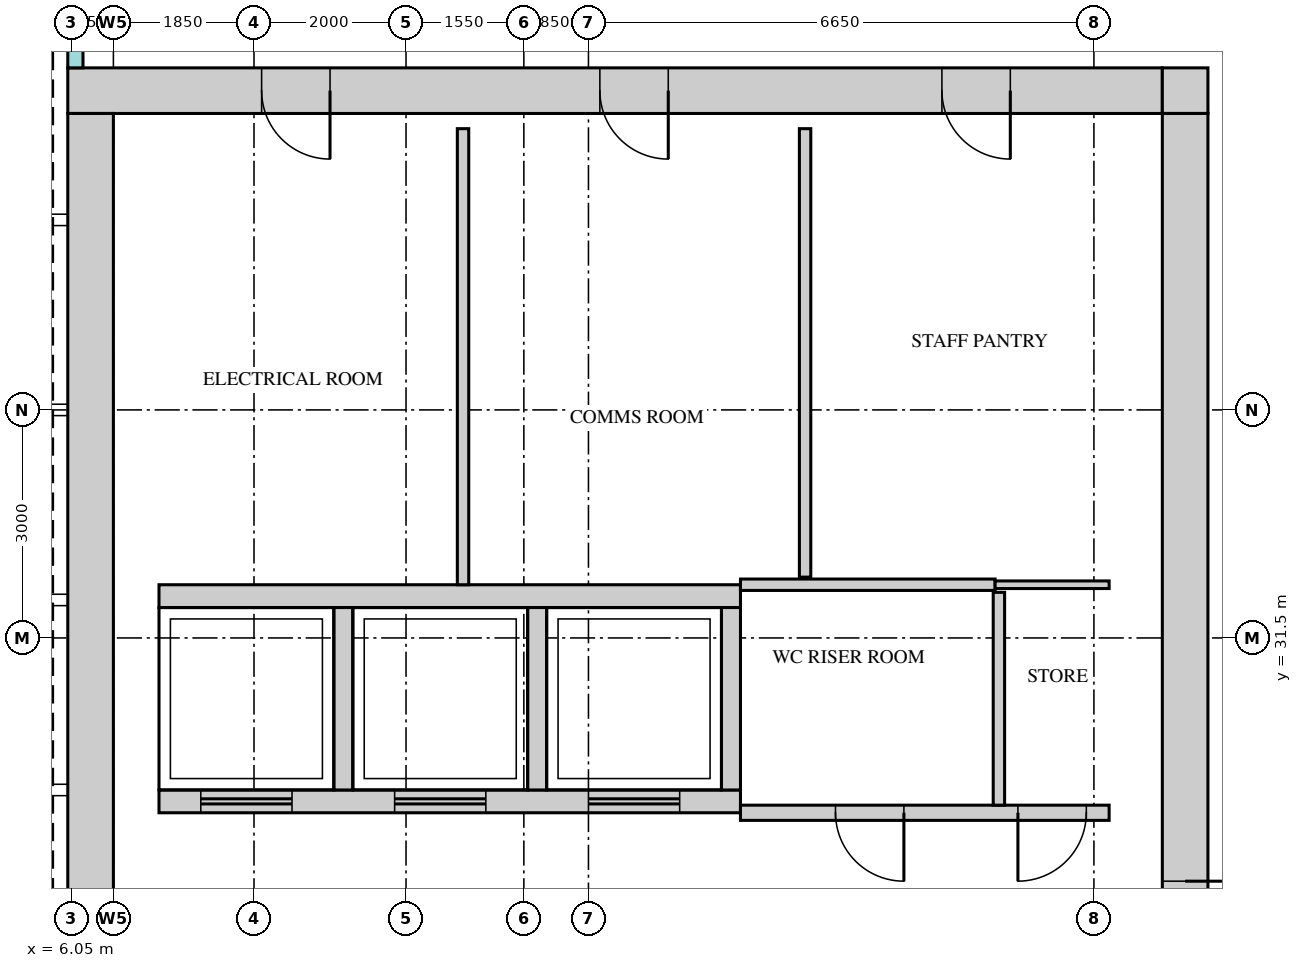
"""IFC4 building model, lengths in metres.
Left out: names, types, materials, properties, quantities, classifications, styles, units other than length and angle.
Written with IfcOpenShell. Run it as: python <this file> out.ifc"""

import sys

from ifc_helpers import new_model, si_unit, direction, frame, frame_2d, origin, place, context, subcontext, project, spatial, rectangle, extrude, source, transform, mapped, element, fill, save


model = new_model("IFC4")
c1 = context("Model", 3, precision=1e-05, world=origin(), true_north=direction((0.0, 1.0)))
c2 = subcontext(c1, "Body", "Model", "MODEL_VIEW")
j1 = project(units=[si_unit("LENGTHUNIT", "METRE"), si_unit("PLANEANGLEUNIT", "RADIAN")], contexts=[c1])
p1 = place(None, origin())
s1 = spatial("IfcSite", under=j1, at=p1, CompositionType="ELEMENT")
p2 = place(p1, origin())
s2 = spatial("IfcBuilding", under=s1, at=p2, CompositionType="ELEMENT")
p3 = place(p2, frame((0.0, 0.0, 282.2)))
s3 = spatial("IfcBuildingStorey", under=s2, at=p3, CompositionType="ELEMENT", Elevation=282.2)
m1 = source(origin(), c2, "Body", "SweptSolid", [
    extrude(rectangle(XDim=14.4, YDim=0.6, at=frame_2d((7.2, 0.0))), origin(), (0.0, 0.0, 1.0), 3.75),
])
p4 = place(p3, frame((6.0, 38.7, 0.0), z_axis=(0.0, 0.0, 1.0), x_axis=(1.0, 0.0, 0.0)))
e1 = element("IfcWall", 1, at=p4, inside=s3, PredefinedType="SHEAR", context=c2, shape_type="MappedRepresentation", body=[
    mapped(m1, transform((0.0, 0.0, 0.0))),
])
m2 = source(origin(), c2, "Body", "SweptSolid", [
    extrude(rectangle(XDim=0.9, YDim=2.1, at=frame_2d((0.45, 1.05))), frame((0.0, 0.31, 0.0), z_axis=(0.0, -1.0, 0.0), x_axis=(1.0, 0.0, 0.0)), (0.0, 0.0, 1.0), 0.62),
])
p5 = place(p4, frame((2.55, 0.0, 0.0)))
e2 = element("IfcOpeningElement", 2, at=p5, cuts=e1, PredefinedType="OPENING", context=c2, shape_type="MappedRepresentation", body=[
    mapped(m2, transform((0.0, 0.0, 0.0))),
])
p6 = place(p4, frame((7.0, 0.0, 0.0)))
e3 = element("IfcOpeningElement", 3, at=p6, cuts=e1, PredefinedType="OPENING", context=c2, shape_type="MappedRepresentation", body=[
    mapped(m2, transform((0.0, 0.0, 0.0))),
])
p7 = place(p4, frame((11.5, 0.0, 0.0)))
e4 = element("IfcOpeningElement", 4, at=p7, cuts=e1, PredefinedType="OPENING", context=c2, shape_type="MappedRepresentation", body=[
    mapped(m2, transform((0.0, 0.0, 0.0))),
])
m3 = source(origin(), c2, "Body", "SweptSolid", [
    extrude(rectangle(XDim=0.6, YDim=0.6, at=frame_2d((0.3, 0.0))), origin(), (0.0, 0.0, 1.0), 3.75),
])
p8 = place(p3, frame((20.4, 38.7, 0.0), z_axis=(0.0, 0.0, 1.0), x_axis=(1.0, 0.0, 0.0)))
e5 = element("IfcWall", 5, at=p8, inside=s3, PredefinedType="SHEAR", context=c2, shape_type="MappedRepresentation", body=[
    mapped(m3, transform((0.0, 0.0, 0.0))),
])
m4 = source(origin(), c2, "Body", "SweptSolid", [
    extrude(rectangle(XDim=22.8, YDim=0.6, at=frame_2d((11.4, 0.0))), origin(), (0.0, 0.0, 1.0), 3.75),
])
p9 = place(p3, frame((20.7, 15.6, 0.0), z_axis=(0.0, 0.0, 1.0), x_axis=(0.0, 1.0, 0.0)))
e6 = element("IfcWall", 6, at=p9, inside=s3, PredefinedType="SHEAR", context=c2, shape_type="MappedRepresentation", body=[
    mapped(m4, transform((0.0, 0.0, 0.0))),
])
m5 = source(origin(), c2, "Body", "SweptSolid", [
    extrude(rectangle(XDim=1.8, YDim=2.1, at=frame_2d((0.9, 1.05))), frame((0.0, 0.31, 0.0), z_axis=(0.0, -1.0, 0.0), x_axis=(1.0, 0.0, 0.0)), (0.0, 0.0, 1.0), 0.62),
])
p10 = place(p9, frame((10.9, 0.0, 0.0)))
e7 = element("IfcOpeningElement", 7, at=p10, cuts=e6, PredefinedType="OPENING", context=c2, shape_type="MappedRepresentation", body=[
    mapped(m5, transform((0.0, 0.0, 0.0))),
])
p11 = place(p9, frame((0.55, 0.0, 0.0)))
e8 = element("IfcOpeningElement", 8, at=p11, cuts=e6, PredefinedType="OPENING", context=c2, shape_type="MappedRepresentation", body=[
    mapped(m2, transform((0.0, 0.0, 0.0))),
])
m6 = source(origin(), c2, "Body", "SweptSolid", [
    extrude(rectangle(XDim=1.0, YDim=2.1, at=frame_2d((0.5, 1.05))), frame((0.0, 0.31, 0.0), z_axis=(0.0, -1.0, 0.0), x_axis=(1.0, 0.0, 0.0)), (0.0, 0.0, 1.0), 0.62),
])
p12 = place(p9, frame((2.3, 0.0, 0.0)))
e9 = element("IfcOpeningElement", 9, at=p12, cuts=e6, PredefinedType="OPENING", context=c2, shape_type="MappedRepresentation", body=[
    mapped(m6, transform((0.0, 0.0, 0.0))),
])
p13 = place(p9, frame((5.1, 0.0, 0.0)))
e10 = element("IfcOpeningElement", 10, at=p13, cuts=e6, PredefinedType="OPENING", context=c2, shape_type="MappedRepresentation", body=[
    mapped(m2, transform((0.0, 0.0, 0.0))),
])
p14 = place(p3, frame((6.3, 15.6, 0.0), z_axis=(0.0, 0.0, 1.0), x_axis=(0.0, 1.0, 0.0)))
e11 = element("IfcWall", 11, at=p14, inside=s3, PredefinedType="SHEAR", context=c2, shape_type="MappedRepresentation", body=[
    mapped(m4, transform((0.0, 0.0, 0.0))),
])
m7 = source(origin(), c2, "Body", "SweptSolid", [
    extrude(rectangle(XDim=7.65, YDim=0.3, at=frame_2d((3.825, 0.0))), origin(), (0.0, 0.0, 1.0), 3.75),
])
p15 = place(p3, frame((7.2, 32.05, 0.0), z_axis=(0.0, 0.0, 1.0), x_axis=(1.0, 0.0, 0.0)))
e12 = element("IfcWall", 12, at=p15, inside=s3, PredefinedType="STANDARD", context=c2, shape_type="MappedRepresentation", body=[
    mapped(m7, transform((0.0, 0.0, 0.0))),
])
p16 = place(p3, frame((7.2, 29.35, 0.0), z_axis=(0.0, 0.0, 1.0), x_axis=(1.0, 0.0, 0.0)))
e13 = element("IfcWall", 13, at=p16, inside=s3, PredefinedType="STANDARD", context=c2, shape_type="MappedRepresentation", body=[
    mapped(m7, transform((0.0, 0.0, 0.0))),
])
m8 = source(origin(), c2, "Body", "SweptSolid", [
    extrude(rectangle(XDim=1.2, YDim=2.1, at=frame_2d((0.6, 1.05))), frame((0.0, 0.16, 0.0), z_axis=(0.0, -1.0, 0.0), x_axis=(1.0, 0.0, 0.0)), (0.0, 0.0, 1.0), 0.32),
])
p17 = place(p16, frame((0.55, 0.0, 0.0)))
e14 = element("IfcOpeningElement", 14, at=p17, cuts=e13, PredefinedType="OPENING", context=c2, shape_type="MappedRepresentation", body=[
    mapped(m8, transform((0.0, 0.0, 0.0))),
])
p18 = place(p16, frame((3.1, 0.0, 0.0)))
e15 = element("IfcOpeningElement", 15, at=p18, cuts=e13, PredefinedType="OPENING", context=c2, shape_type="MappedRepresentation", body=[
    mapped(m8, transform((0.0, 0.0, 0.0))),
])
p19 = place(p16, frame((5.65, 0.0, 0.0)))
e16 = element("IfcOpeningElement", 16, at=p19, cuts=e13, PredefinedType="OPENING", context=c2, shape_type="MappedRepresentation", body=[
    mapped(m8, transform((0.0, 0.0, 0.0))),
])
m9 = source(origin(), c2, "Body", "SweptSolid", [
    extrude(rectangle(XDim=2.4, YDim=0.25, at=frame_2d((1.2, 0.0))), origin(), (0.0, 0.0, 1.0), 3.75),
])
for number, where, z_axis, x_axis in (
    (17, (9.625, 29.5, 0.0), (0.0, 0.0, 1.0), (0.0, 1.0, 0.0)),
    (18, (12.175, 29.5, 0.0), (0.0, 0.0, 1.0), (0.0, 1.0, 0.0)),
    (19, (14.725, 29.5, 0.0), (0.0, 0.0, 1.0), (0.0, 1.0, 0.0)),
):
    element("IfcWall", number, at=place(p3, frame(where, z_axis=z_axis, x_axis=x_axis)), inside=s3, PredefinedType="STANDARD", context=c2, shape_type="MappedRepresentation", body=[
        mapped(m9, transform((0.0, 0.0, 0.0))),
    ])
m10 = source(origin(), c2, "Body", "SweptSolid", [
    extrude(rectangle(XDim=4.85, YDim=0.2, at=frame_2d((2.425, 0.0))), origin(), (0.0, 0.0, 1.0), 3.8),
])
p20 = place(p3, frame((14.85, 29.2, 0.0), z_axis=(0.0, 0.0, 1.0), x_axis=(1.0, 0.0, 0.0)))
e20 = element("IfcWall", 20, at=p20, inside=s3, PredefinedType="PARTITIONING", context=c2, shape_type="MappedRepresentation", body=[
    mapped(m10, transform((0.0, 0.0, 0.0))),
])
m11 = source(origin(), c2, "Body", "SweptSolid", [
    extrude(rectangle(XDim=0.9, YDim=2.1, at=frame_2d((0.45, 1.05))), frame((0.0, 0.11, 0.0), z_axis=(0.0, -1.0, 0.0), x_axis=(1.0, 0.0, 0.0)), (0.0, 0.0, 1.0), 0.22),
])
p21 = place(p20, frame((1.25, 0.0, 0.0)))
e21 = element("IfcOpeningElement", 21, at=p21, cuts=e20, PredefinedType="OPENING", context=c2, shape_type="MappedRepresentation", body=[
    mapped(m11, transform((0.0, 0.0, 0.0))),
])
p22 = place(p20, frame((3.65, 0.0, 0.0)))
e22 = element("IfcOpeningElement", 22, at=p22, cuts=e20, PredefinedType="OPENING", context=c2, shape_type="MappedRepresentation", body=[
    mapped(m11, transform((0.0, 0.0, 0.0))),
])
m12 = source(origin(), c2, "Body", "SweptSolid", [
    extrude(rectangle(XDim=2.8, YDim=0.15, at=frame_2d((1.4, 0.0))), origin(), (0.0, 0.0, 1.0), 3.8),
])
p23 = place(p3, frame((18.25, 29.3, 0.0), z_axis=(0.0, 0.0, 1.0), x_axis=(0.0, 1.0, 0.0)))
e23 = element("IfcWall", 23, at=p23, inside=s3, PredefinedType="PARTITIONING", context=c2, shape_type="MappedRepresentation", body=[
    mapped(m12, transform((0.0, 0.0, 0.0))),
])
m13 = source(origin(), c2, "Body", "SweptSolid", [
    extrude(rectangle(XDim=6.0, YDim=0.15, at=frame_2d((3.0, 0.0))), origin(), (0.0, 0.0, 1.0), 3.8),
])
p24 = place(p3, frame((11.2, 32.2, 0.0), z_axis=(0.0, 0.0, 1.0), x_axis=(0.0, 1.0, 0.0)))
e24 = element("IfcWall", 24, at=p24, inside=s3, PredefinedType="PARTITIONING", context=c2, shape_type="MappedRepresentation", body=[
    mapped(m13, transform((0.0, 0.0, 0.0))),
])
m14 = source(origin(), c2, "Body", "SweptSolid", [
    extrude(rectangle(XDim=3.35, YDim=0.15, at=frame_2d((1.675, 0.0))), origin(), (0.0, 0.0, 1.0), 3.8),
])
p25 = place(p3, frame((14.85, 32.2, 0.0), z_axis=(0.0, 0.0, 1.0), x_axis=(1.0, 0.0, 0.0)))
e25 = element("IfcWall", 25, at=p25, inside=s3, PredefinedType="PARTITIONING", context=c2, shape_type="MappedRepresentation", body=[
    mapped(m14, transform((0.0, 0.0, 0.0))),
])
m15 = source(origin(), c2, "Body", "SweptSolid", [
    extrude(rectangle(XDim=1.5, YDim=0.1, at=frame_2d((0.75, 0.0))), origin(), (0.0, 0.0, 1.0), 3.8),
])
p26 = place(p3, frame((18.2, 32.2, 0.0), z_axis=(0.0, 0.0, 1.0), x_axis=(1.0, 0.0, 0.0)))
e26 = element("IfcWall", 26, at=p26, inside=s3, PredefinedType="PARTITIONING", context=c2, shape_type="MappedRepresentation", body=[
    mapped(m15, transform((0.0, 0.0, 0.0))),
])
m16 = source(origin(), c2, "Body", "SweptSolid", [
    extrude(rectangle(XDim=5.9, YDim=0.15, at=frame_2d((2.95, 0.0))), origin(), (0.0, 0.0, 1.0), 3.8),
])
p27 = place(p3, frame((15.7, 32.3, 0.0), z_axis=(0.0, 0.0, 1.0), x_axis=(0.0, 1.0, 0.0)))
e27 = element("IfcWall", 27, at=p27, inside=s3, PredefinedType="PARTITIONING", context=c2, shape_type="MappedRepresentation", body=[
    mapped(m16, transform((0.0, 0.0, 0.0))),
])
m17 = source(origin(), c2, "Body", "SweptSolid", [
    extrude(rectangle(XDim=0.9, YDim=2.1, at=frame_2d((0.45, 1.05))), frame((0.0, 0.025, 0.0), z_axis=(0.0, -1.0, 0.0), x_axis=(1.0, 0.0, 0.0)), (0.0, 0.0, 1.0), 0.05),
])
p28 = place(p21, origin())
e28 = element("IfcDoor", 28, at=p28, inside=s3, OperationType="SINGLE_SWING_RIGHT", PredefinedType="DOOR", context=c2, shape_type="MappedRepresentation", body=[
    mapped(m17, transform((0.0, 0.0, 0.0))),
])
fill(e21, e28)
p29 = place(p22, origin())
e29 = element("IfcDoor", 29, at=p29, inside=s3, OperationType="SINGLE_SWING_LEFT", PredefinedType="DOOR", context=c2, shape_type="MappedRepresentation", body=[
    mapped(m17, transform((0.0, 0.0, 0.0))),
])
fill(e22, e29)
m18 = source(origin(), c2, "Body", "SweptSolid", [
    extrude(rectangle(XDim=1.8, YDim=2.1, at=frame_2d((0.9, 1.05))), frame((0.0, 0.25, 0.0), z_axis=(0.0, -1.0, 0.0), x_axis=(1.0, 0.0, 0.0)), (0.0, 0.0, 1.0), 0.5),
])
p30 = place(p10, origin())
e30 = element("IfcDoor", 30, at=p30, inside=s3, OperationType="DOUBLE_DOOR_SINGLE_SWING", PredefinedType="DOOR", context=c2, shape_type="MappedRepresentation", body=[
    mapped(m18, transform((0.0, 0.0, 0.0))),
])
fill(e7, e30)
m19 = source(origin(), c2, "Body", "SweptSolid", [
    extrude(rectangle(XDim=0.9, YDim=2.1, at=frame_2d((0.45, 1.05))), frame((0.0, 0.25, 0.0), z_axis=(0.0, -1.0, 0.0), x_axis=(1.0, 0.0, 0.0)), (0.0, 0.0, 1.0), 0.5),
])
p31 = place(p5, origin())
e31 = element("IfcDoor", 31, at=p31, inside=s3, OperationType="SINGLE_SWING_RIGHT", PredefinedType="DOOR", context=c2, shape_type="MappedRepresentation", body=[
    mapped(m19, transform((0.0, 0.0, 0.0))),
])
fill(e2, e31)
p32 = place(p6, origin())
e32 = element("IfcDoor", 32, at=p32, inside=s3, OperationType="SINGLE_SWING_RIGHT", PredefinedType="DOOR", context=c2, shape_type="MappedRepresentation", body=[
    mapped(m19, transform((0.0, 0.0, 0.0))),
])
fill(e3, e32)
p33 = place(p7, origin())
e33 = element("IfcDoor", 33, at=p33, inside=s3, OperationType="SINGLE_SWING_RIGHT", PredefinedType="DOOR", context=c2, shape_type="MappedRepresentation", body=[
    mapped(m19, transform((0.0, 0.0, 0.0))),
])
fill(e4, e33)
m20 = source(origin(), c2, "Body", "SweptSolid", [
    extrude(rectangle(XDim=1.2, YDim=2.1, at=frame_2d((0.6, 1.05))), frame((0.0, 0.025, 0.0), z_axis=(0.0, -1.0, 0.0), x_axis=(1.0, 0.0, 0.0)), (0.0, 0.0, 1.0), 0.05),
])
p34 = place(p17, origin())
e34 = element("IfcDoor", 34, at=p34, inside=s3, OperationType="DOUBLE_DOOR_SLIDING", PredefinedType="DOOR", context=c2, shape_type="MappedRepresentation", body=[
    mapped(m20, transform((0.0, 0.0, 0.0))),
])
fill(e14, e34)
p35 = place(p18, origin())
e35 = element("IfcDoor", 35, at=p35, inside=s3, OperationType="DOUBLE_DOOR_SLIDING", PredefinedType="DOOR", context=c2, shape_type="MappedRepresentation", body=[
    mapped(m20, transform((0.0, 0.0, 0.0))),
])
fill(e15, e35)
p36 = place(p19, origin())
e36 = element("IfcDoor", 36, at=p36, inside=s3, OperationType="DOUBLE_DOOR_SLIDING", PredefinedType="DOOR", context=c2, shape_type="MappedRepresentation", body=[
    mapped(m20, transform((0.0, 0.0, 0.0))),
])
fill(e16, e36)
save(model, sys.argv[1])
